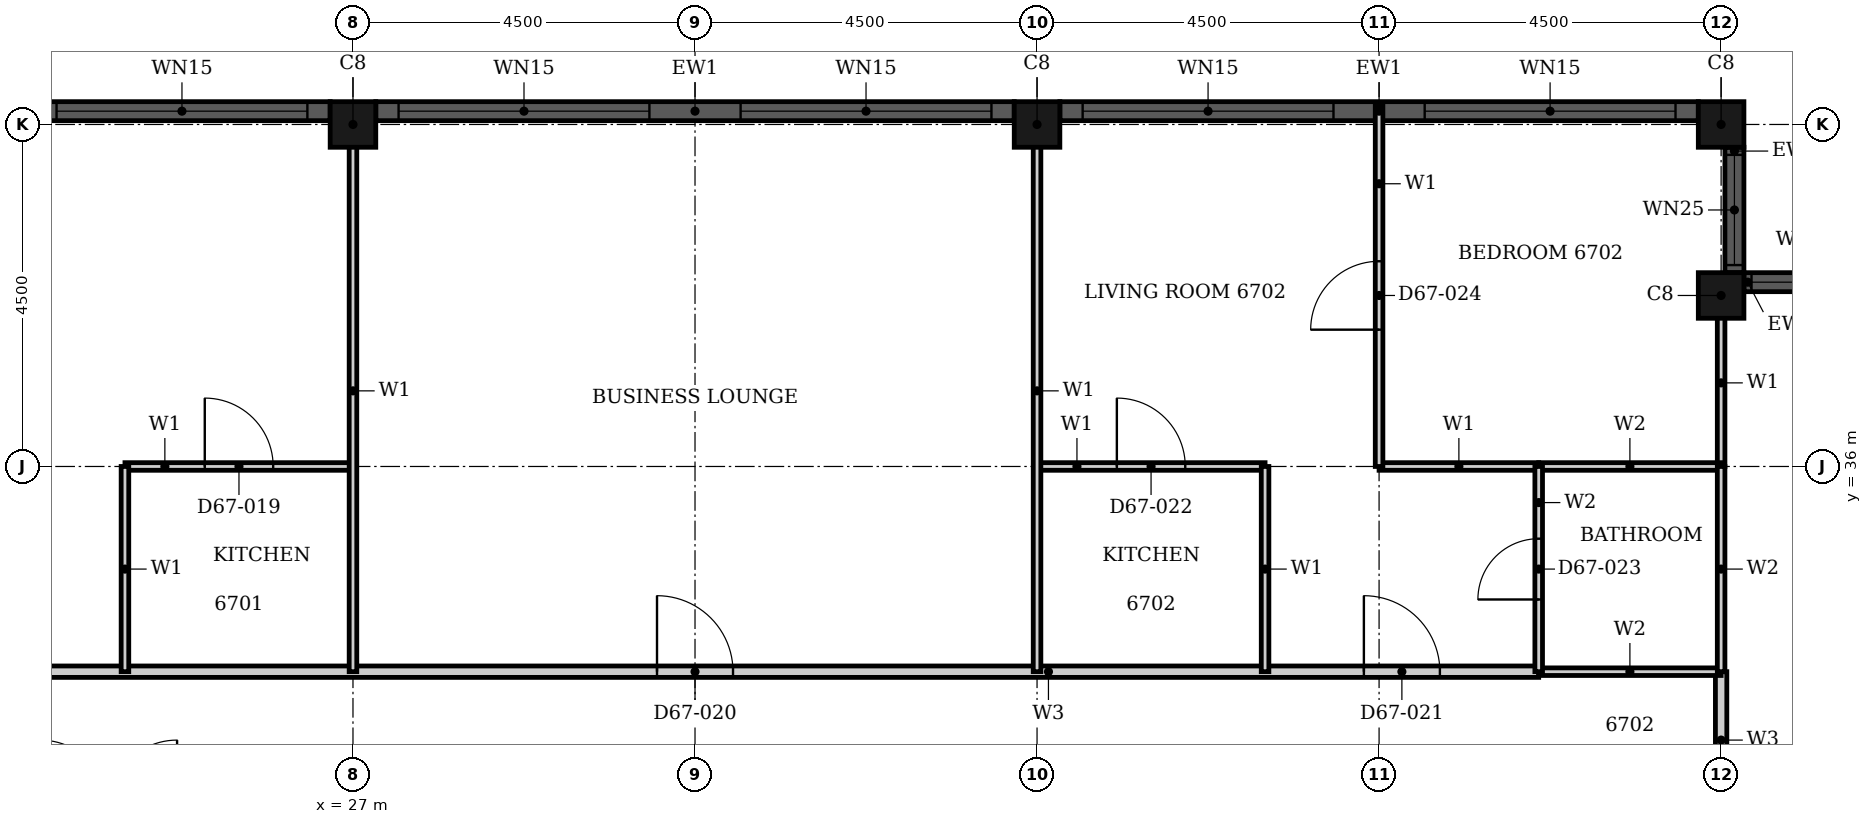
"""IFC4 building model, lengths in metres.
Left out: names, types, materials, properties, quantities, classifications, styles, units other than length and angle.
Written with IfcOpenShell. Run it as: python <this file> out.ifc"""

import sys

from ifc_helpers import new_model, si_unit, direction, frame, frame_2d, origin, origin_2d, place, context, subcontext, project, spatial, rectangle, hollow_rectangle, extrude, element, fill, save


model = new_model("IFC4")
c1 = context("Model", 3, precision=1e-05, world=origin(), true_north=direction((0.0, 1.0)))
c2 = subcontext(c1, "Body", "Model", "MODEL_VIEW")
j1 = project(units=[si_unit("LENGTHUNIT", "METRE"), si_unit("PLANEANGLEUNIT", "RADIAN")], contexts=[c1])
p1 = place(None, origin())
s1 = spatial("IfcSite", under=j1, at=p1, CompositionType="ELEMENT")
p2 = place(p1, origin())
s2 = spatial("IfcBuilding", under=s1, at=p2, CompositionType="ELEMENT")
p3 = place(p2, frame((0.0, 0.0, 263.8)))
s3 = spatial("IfcBuildingStorey", under=s2, at=p3, CompositionType="ELEMENT", Elevation=263.8)
for number, where, z_axis, x_axis in (
    (1, (45.0, 38.25, 0.0), (0.0, 0.0, 1.0), (1.0, 0.0, 0.0)),
    (2, (45.0, 40.5, 0.0), (0.0, 0.0, 1.0), (1.0, 0.0, 0.0)),
    (3, (36.0, 40.5, 0.0), (0.0, 0.0, 1.0), (1.0, 0.0, 0.0)),
    (4, (27.0, 40.5, 0.0), (0.0, 0.0, 1.0), (1.0, 0.0, 0.0)),
):
    element("IfcColumn", number, at=place(p3, frame(where, z_axis=z_axis, x_axis=x_axis)), inside=s3, PredefinedType="COLUMN", context=c2, shape_type="SweptSolid", body=[
        extrude(hollow_rectangle(XDim=0.6, YDim=0.6, WallThickness=0.02, at=origin_2d()), origin(), (0.0, 0.0, 1.0), 3.7),
    ])
p4 = place(p3, frame((46.95, 38.425, 0.0), z_axis=(0.0, 0.0, 1.0), x_axis=(-1.0, 0.0, 0.0)))
e5 = element("IfcWall", 5, at=p4, inside=s3, PredefinedType="SOLIDWALL", context=c2, shape_type="SweptSolid", body=[
    extrude(rectangle(XDim=1.65, YDim=0.25, at=frame_2d((0.825, 0.0))), origin(), (0.0, 0.0, 1.0), 3.7),
])
p5 = place(p4, frame((0.1, 0.0, 0.9)))
e6 = element("IfcOpeningElement", 6, at=p5, cuts=e5, PredefinedType="OPENING", context=c2, shape_type="SweptSolid", body=[
    extrude(rectangle(XDim=1.45, YDim=1.85, at=frame_2d((0.725, 0.925))), frame((0.0, 0.135, 0.0), z_axis=(0.0, -1.0, 0.0), x_axis=(1.0, 0.0, 0.0)), (0.0, 0.0, 1.0), 0.27),
])
p6 = place(p3, frame((45.175, 38.55, 0.0), z_axis=(0.0, 0.0, 1.0), x_axis=(0.0, 1.0, 0.0)))
e7 = element("IfcWall", 7, at=p6, inside=s3, PredefinedType="SOLIDWALL", context=c2, shape_type="SweptSolid", body=[
    extrude(rectangle(XDim=1.65, YDim=0.25, at=frame_2d((0.825, 0.0))), origin(), (0.0, 0.0, 1.0), 3.7),
])
p7 = place(p6, frame((0.1, 0.0, 0.9)))
e8 = element("IfcOpeningElement", 8, at=p7, cuts=e7, PredefinedType="OPENING", context=c2, shape_type="SweptSolid", body=[
    extrude(rectangle(XDim=1.45, YDim=1.85, at=frame_2d((0.725, 0.925))), frame((0.0, 0.135, 0.0), z_axis=(0.0, -1.0, 0.0), x_axis=(1.0, 0.0, 0.0)), (0.0, 0.0, 1.0), 0.27),
])
p8 = place(p3, frame((44.7, 40.675, 0.0), z_axis=(0.0, 0.0, 1.0), x_axis=(-1.0, 0.0, 0.0)))
e9 = element("IfcWall", 9, at=p8, inside=s3, PredefinedType="SOLIDWALL", context=c2, shape_type="SweptSolid", body=[
    extrude(rectangle(XDim=8.4, YDim=0.25, at=frame_2d((4.2, 0.0))), origin(), (0.0, 0.0, 1.0), 3.7),
])
p9 = place(p8, frame((0.3, 0.0, 0.45)))
e10 = element("IfcOpeningElement", 10, at=p9, cuts=e9, PredefinedType="OPENING", context=c2, shape_type="SweptSolid", body=[
    extrude(rectangle(XDim=3.3, YDim=2.3, at=frame_2d((1.65, 1.15))), frame((0.0, 0.135, 0.0), z_axis=(0.0, -1.0, 0.0), x_axis=(1.0, 0.0, 0.0)), (0.0, 0.0, 1.0), 0.27),
])
p10 = place(p8, frame((4.8, 0.0, 0.45)))
e11 = element("IfcOpeningElement", 11, at=p10, cuts=e9, PredefinedType="OPENING", context=c2, shape_type="SweptSolid", body=[
    extrude(rectangle(XDim=3.3, YDim=2.3, at=frame_2d((1.65, 1.15))), frame((0.0, 0.135, 0.0), z_axis=(0.0, -1.0, 0.0), x_axis=(1.0, 0.0, 0.0)), (0.0, 0.0, 1.0), 0.27),
])
p11 = place(p3, frame((35.7, 40.675, 0.0), z_axis=(0.0, 0.0, 1.0), x_axis=(-1.0, 0.0, 0.0)))
e12 = element("IfcWall", 12, at=p11, inside=s3, PredefinedType="SOLIDWALL", context=c2, shape_type="SweptSolid", body=[
    extrude(rectangle(XDim=8.4, YDim=0.25, at=frame_2d((4.2, 0.0))), origin(), (0.0, 0.0, 1.0), 3.7),
])
p12 = place(p11, frame((0.3, 0.0, 0.45)))
e13 = element("IfcOpeningElement", 13, at=p12, cuts=e12, PredefinedType="OPENING", context=c2, shape_type="SweptSolid", body=[
    extrude(rectangle(XDim=3.3, YDim=2.3, at=frame_2d((1.65, 1.15))), frame((0.0, 0.135, 0.0), z_axis=(0.0, -1.0, 0.0), x_axis=(1.0, 0.0, 0.0)), (0.0, 0.0, 1.0), 0.27),
])
p13 = place(p11, frame((4.8, 0.0, 0.45)))
e14 = element("IfcOpeningElement", 14, at=p13, cuts=e12, PredefinedType="OPENING", context=c2, shape_type="SweptSolid", body=[
    extrude(rectangle(XDim=3.3, YDim=2.3, at=frame_2d((1.65, 1.15))), frame((0.0, 0.135, 0.0), z_axis=(0.0, -1.0, 0.0), x_axis=(1.0, 0.0, 0.0)), (0.0, 0.0, 1.0), 0.27),
])
p14 = place(p3, frame((26.7, 40.675, 0.0), z_axis=(0.0, 0.0, 1.0), x_axis=(-1.0, 0.0, 0.0)))
e15 = element("IfcWall", 15, at=p14, inside=s3, PredefinedType="SOLIDWALL", context=c2, shape_type="SweptSolid", body=[
    extrude(rectangle(XDim=8.4, YDim=0.25, at=frame_2d((4.2, 0.0))), origin(), (0.0, 0.0, 1.0), 3.7),
])
p15 = place(p14, frame((0.3, 0.0, 0.45)))
e16 = element("IfcOpeningElement", 16, at=p15, cuts=e15, PredefinedType="OPENING", context=c2, shape_type="SweptSolid", body=[
    extrude(rectangle(XDim=3.3, YDim=2.3, at=frame_2d((1.65, 1.15))), frame((0.0, 0.135, 0.0), z_axis=(0.0, -1.0, 0.0), x_axis=(1.0, 0.0, 0.0)), (0.0, 0.0, 1.0), 0.27),
])
p16 = place(p14, frame((4.8, 0.0, 0.45)))
e17 = element("IfcOpeningElement", 17, at=p16, cuts=e15, PredefinedType="OPENING", context=c2, shape_type="SweptSolid", body=[
    extrude(rectangle(XDim=3.3, YDim=2.3, at=frame_2d((1.65, 1.15))), frame((0.0, 0.135, 0.0), z_axis=(0.0, -1.0, 0.0), x_axis=(1.0, 0.0, 0.0)), (0.0, 0.0, 1.0), 0.27),
])
p17 = place(p3, frame((20.4, 33.3, 0.0), z_axis=(0.0, 0.0, 1.0), x_axis=(1.0, 0.0, 0.0)))
e18 = element("IfcWall", 18, at=p17, inside=s3, PredefinedType="PARTITIONING", context=c2, shape_type="SweptSolid", body=[
    extrude(rectangle(XDim=22.2, YDim=0.15, at=frame_2d((11.1, 0.0))), origin(), (0.0, 0.0, 1.0), 3.4),
])
p18 = place(p17, frame((1.3, 0.0, 0.0)))
e19 = element("IfcOpeningElement", 19, at=p18, cuts=e18, PredefinedType="OPENING", context=c2, shape_type="SweptSolid", body=[
    extrude(rectangle(XDim=1.0, YDim=2.2, at=frame_2d((0.5, 1.1))), frame((0.0, 0.085, 0.0), z_axis=(0.0, -1.0, 0.0), x_axis=(1.0, 0.0, 0.0)), (0.0, 0.0, 1.0), 0.17),
])
p19 = place(p17, frame((10.6, 0.0, 0.0)))
e20 = element("IfcOpeningElement", 20, at=p19, cuts=e18, PredefinedType="OPENING", context=c2, shape_type="SweptSolid", body=[
    extrude(rectangle(XDim=1.0, YDim=2.1, at=frame_2d((0.5, 1.05))), frame((0.0, 0.085, 0.0), z_axis=(0.0, -1.0, 0.0), x_axis=(1.0, 0.0, 0.0)), (0.0, 0.0, 1.0), 0.17),
])
p20 = place(p17, frame((19.9, 0.0, 0.0)))
e21 = element("IfcOpeningElement", 21, at=p20, cuts=e18, PredefinedType="OPENING", context=c2, shape_type="SweptSolid", body=[
    extrude(rectangle(XDim=1.0, YDim=2.2, at=frame_2d((0.5, 1.1))), frame((0.0, 0.085, 0.0), z_axis=(0.0, -1.0, 0.0), x_axis=(1.0, 0.0, 0.0)), (0.0, 0.0, 1.0), 0.17),
])
p21 = place(p3, frame((45.0, 31.5, 0.0), z_axis=(0.0, 0.0, 1.0), x_axis=(0.0, 1.0, 0.0)))
e22 = element("IfcWall", 22, at=p21, inside=s3, PredefinedType="PARTITIONING", context=c2, shape_type="SweptSolid", body=[
    extrude(rectangle(XDim=1.8, YDim=0.15, at=frame_2d((0.9, 0.0))), origin(), (0.0, 0.0, 1.0), 3.4),
])
p22 = place(p3, frame((24.0, 36.0, 0.0), z_axis=(0.0, 0.0, 1.0), x_axis=(1.0, 0.0, 0.0)))
e23 = element("IfcWall", 23, at=p22, inside=s3, PredefinedType="PARTITIONING", context=c2, shape_type="SweptSolid", body=[
    extrude(rectangle(XDim=3.0, YDim=0.1, at=frame_2d((1.5, 0.0))), origin(), (0.0, 0.0, 1.0), 3.4),
])
p23 = place(p22, frame((1.05, 0.0, 0.0)))
e24 = element("IfcOpeningElement", 24, at=p23, cuts=e23, PredefinedType="OPENING", context=c2, shape_type="SweptSolid", body=[
    extrude(rectangle(XDim=0.9, YDim=2.1, at=frame_2d((0.45, 1.05))), frame((0.0, 0.06, 0.0), z_axis=(0.0, -1.0, 0.0), x_axis=(1.0, 0.0, 0.0)), (0.0, 0.0, 1.0), 0.12),
])
p24 = place(p3, frame((40.5, 36.0, 0.0), z_axis=(0.0, 0.0, 1.0), x_axis=(1.0, 0.0, 0.0)))
e25 = element("IfcWall", 25, at=p24, inside=s3, PredefinedType="PARTITIONING", context=c2, shape_type="SweptSolid", body=[
    extrude(rectangle(XDim=2.1, YDim=0.1, at=frame_2d((1.05, 0.0))), origin(), (0.0, 0.0, 1.0), 3.4),
])
p25 = place(p3, frame((36.0, 36.0, 0.0), z_axis=(0.0, 0.0, 1.0), x_axis=(1.0, 0.0, 0.0)))
e26 = element("IfcWall", 26, at=p25, inside=s3, PredefinedType="PARTITIONING", context=c2, shape_type="SweptSolid", body=[
    extrude(rectangle(XDim=3.0, YDim=0.1, at=frame_2d((1.5, 0.0))), origin(), (0.0, 0.0, 1.0), 3.4),
])
p26 = place(p25, frame((1.05, 0.0, 0.0)))
e27 = element("IfcOpeningElement", 27, at=p26, cuts=e26, PredefinedType="OPENING", context=c2, shape_type="SweptSolid", body=[
    extrude(rectangle(XDim=0.9, YDim=2.1, at=frame_2d((0.45, 1.05))), frame((0.0, 0.06, 0.0), z_axis=(0.0, -1.0, 0.0), x_axis=(1.0, 0.0, 0.0)), (0.0, 0.0, 1.0), 0.12),
])
p27 = place(p3, frame((24.0, 33.3, 0.0), z_axis=(0.0, 0.0, 1.0), x_axis=(0.0, 1.0, 0.0)))
e28 = element("IfcWall", 28, at=p27, inside=s3, PredefinedType="PARTITIONING", context=c2, shape_type="SweptSolid", body=[
    extrude(rectangle(XDim=2.7, YDim=0.1, at=frame_2d((1.35, 0.0))), origin(), (0.0, 0.0, 1.0), 3.4),
])
for number, where, z_axis, x_axis in (
    (29, (27.0, 33.3, 0.0), (0.0, 0.0, 1.0), (0.0, 1.0, 0.0)),
    (30, (36.0, 33.3, 0.0), (0.0, 0.0, 1.0), (0.0, 1.0, 0.0)),
):
    element("IfcWall", number, at=place(p3, frame(where, z_axis=z_axis, x_axis=x_axis)), inside=s3, PredefinedType="PARTITIONING", context=c2, shape_type="SweptSolid", body=[
        extrude(rectangle(XDim=7.39, YDim=0.1, at=frame_2d((3.695, 0.0))), origin(), (0.0, 0.0, 1.0), 3.4),
    ])
p28 = place(p3, frame((39.0, 33.3, 0.0), z_axis=(0.0, 0.0, 1.0), x_axis=(0.0, 1.0, 0.0)))
e31 = element("IfcWall", 31, at=p28, inside=s3, PredefinedType="PARTITIONING", context=c2, shape_type="SweptSolid", body=[
    extrude(rectangle(XDim=2.7, YDim=0.1, at=frame_2d((1.35, 0.0))), origin(), (0.0, 0.0, 1.0), 3.4),
])
p29 = place(p3, frame((40.5, 36.0, 0.0), z_axis=(0.0, 0.0, 1.0), x_axis=(0.0, 1.0, 0.0)))
e32 = element("IfcWall", 32, at=p29, inside=s3, PredefinedType="PARTITIONING", context=c2, shape_type="SweptSolid", body=[
    extrude(rectangle(XDim=4.74, YDim=0.1, at=frame_2d((2.37, 0.0))), origin(), (0.0, 0.0, 1.0), 3.4),
])
p30 = place(p29, frame((1.8, 0.0, 0.0)))
e33 = element("IfcOpeningElement", 33, at=p30, cuts=e32, PredefinedType="OPENING", context=c2, shape_type="SweptSolid", body=[
    extrude(rectangle(XDim=0.9, YDim=2.1, at=frame_2d((0.45, 1.05))), frame((0.0, 0.06, 0.0), z_axis=(0.0, -1.0, 0.0), x_axis=(1.0, 0.0, 0.0)), (0.0, 0.0, 1.0), 0.12),
])
p31 = place(p3, frame((45.0, 36.0, 0.0), z_axis=(0.0, 0.0, 1.0), x_axis=(0.0, 1.0, 0.0)))
e34 = element("IfcWall", 34, at=p31, inside=s3, PredefinedType="PARTITIONING", context=c2, shape_type="SweptSolid", body=[
    extrude(rectangle(XDim=2.2, YDim=0.1, at=frame_2d((1.1, 0.0))), origin(), (0.0, 0.0, 1.0), 3.4),
])
for number, where, z_axis, x_axis in (
    (35, (42.6, 33.3, 0.0), (0.0, 0.0, 1.0), (1.0, 0.0, 0.0)),
    (36, (42.6, 36.0, 0.0), (0.0, 0.0, 1.0), (1.0, 0.0, 0.0)),
):
    element("IfcWall", number, at=place(p3, frame(where, z_axis=z_axis, x_axis=x_axis)), inside=s3, PredefinedType="PARTITIONING", context=c2, shape_type="SweptSolid", body=[
        extrude(rectangle(XDim=2.4, YDim=0.1, at=frame_2d((1.2, 0.0))), origin(), (0.0, 0.0, 1.0), 3.4),
    ])
p32 = place(p3, frame((42.6, 33.3, 0.0), z_axis=(0.0, 0.0, 1.0), x_axis=(0.0, 1.0, 0.0)))
e37 = element("IfcWall", 37, at=p32, inside=s3, PredefinedType="PARTITIONING", context=c2, shape_type="SweptSolid", body=[
    extrude(rectangle(XDim=2.7, YDim=0.1, at=frame_2d((1.35, 0.0))), origin(), (0.0, 0.0, 1.0), 3.4),
])
p33 = place(p32, frame((0.95, 0.0, 0.0)))
e38 = element("IfcOpeningElement", 38, at=p33, cuts=e37, PredefinedType="OPENING", context=c2, shape_type="SweptSolid", body=[
    extrude(rectangle(XDim=0.8, YDim=2.1, at=frame_2d((0.4, 1.05))), frame((0.0, 0.06, 0.0), z_axis=(0.0, -1.0, 0.0), x_axis=(1.0, 0.0, 0.0)), (0.0, 0.0, 1.0), 0.12),
])
p34 = place(p3, frame((45.0, 33.3, 0.0), z_axis=(0.0, 0.0, 1.0), x_axis=(0.0, 1.0, 0.0)))
e39 = element("IfcWall", 39, at=p34, inside=s3, PredefinedType="PARTITIONING", context=c2, shape_type="SweptSolid", body=[
    extrude(rectangle(XDim=2.7, YDim=0.1, at=frame_2d((1.35, 0.0))), origin(), (0.0, 0.0, 1.0), 3.4),
])
p35 = place(p5, origin())
e40 = element("IfcWindow", 40, at=p35, inside=s3, PartitioningType="SINGLE_PANEL", PredefinedType="WINDOW", context=c2, shape_type="SweptSolid", body=[
    extrude(rectangle(XDim=1.45, YDim=1.85, at=frame_2d((0.725, 0.925))), frame((0.0, 0.03, 0.0), z_axis=(0.0, -1.0, 0.0), x_axis=(1.0, 0.0, 0.0)), (0.0, 0.0, 1.0), 0.06),
])
fill(e6, e40)
p36 = place(p7, origin())
e41 = element("IfcWindow", 41, at=p36, inside=s3, PartitioningType="SINGLE_PANEL", PredefinedType="WINDOW", context=c2, shape_type="SweptSolid", body=[
    extrude(rectangle(XDim=1.45, YDim=1.85, at=frame_2d((0.725, 0.925))), frame((0.0, 0.03, 0.0), z_axis=(0.0, -1.0, 0.0), x_axis=(1.0, 0.0, 0.0)), (0.0, 0.0, 1.0), 0.06),
])
fill(e8, e41)
p37 = place(p9, origin())
e42 = element("IfcWindow", 42, at=p37, inside=s3, PartitioningType="SINGLE_PANEL", PredefinedType="WINDOW", context=c2, shape_type="SweptSolid", body=[
    extrude(rectangle(XDim=3.3, YDim=2.3, at=frame_2d((1.65, 1.15))), frame((0.0, 0.03, 0.0), z_axis=(0.0, -1.0, 0.0), x_axis=(1.0, 0.0, 0.0)), (0.0, 0.0, 1.0), 0.06),
])
fill(e10, e42)
p38 = place(p10, origin())
e43 = element("IfcWindow", 43, at=p38, inside=s3, PartitioningType="SINGLE_PANEL", PredefinedType="WINDOW", context=c2, shape_type="SweptSolid", body=[
    extrude(rectangle(XDim=3.3, YDim=2.3, at=frame_2d((1.65, 1.15))), frame((0.0, 0.03, 0.0), z_axis=(0.0, -1.0, 0.0), x_axis=(1.0, 0.0, 0.0)), (0.0, 0.0, 1.0), 0.06),
])
fill(e11, e43)
p39 = place(p12, origin())
e44 = element("IfcWindow", 44, at=p39, inside=s3, PartitioningType="SINGLE_PANEL", PredefinedType="WINDOW", context=c2, shape_type="SweptSolid", body=[
    extrude(rectangle(XDim=3.3, YDim=2.3, at=frame_2d((1.65, 1.15))), frame((0.0, 0.03, 0.0), z_axis=(0.0, -1.0, 0.0), x_axis=(1.0, 0.0, 0.0)), (0.0, 0.0, 1.0), 0.06),
])
fill(e13, e44)
p40 = place(p13, origin())
e45 = element("IfcWindow", 45, at=p40, inside=s3, PartitioningType="SINGLE_PANEL", PredefinedType="WINDOW", context=c2, shape_type="SweptSolid", body=[
    extrude(rectangle(XDim=3.3, YDim=2.3, at=frame_2d((1.65, 1.15))), frame((0.0, 0.03, 0.0), z_axis=(0.0, -1.0, 0.0), x_axis=(1.0, 0.0, 0.0)), (0.0, 0.0, 1.0), 0.06),
])
fill(e14, e45)
p41 = place(p15, origin())
e46 = element("IfcWindow", 46, at=p41, inside=s3, PartitioningType="SINGLE_PANEL", PredefinedType="WINDOW", context=c2, shape_type="SweptSolid", body=[
    extrude(rectangle(XDim=3.3, YDim=2.3, at=frame_2d((1.65, 1.15))), frame((0.0, 0.03, 0.0), z_axis=(0.0, -1.0, 0.0), x_axis=(1.0, 0.0, 0.0)), (0.0, 0.0, 1.0), 0.06),
])
fill(e16, e46)
p42 = place(p23, origin())
e47 = element("IfcDoor", 47, at=p42, inside=s3, OperationType="SINGLE_SWING_RIGHT", PredefinedType="DOOR", context=c2, shape_type="SweptSolid", body=[
    extrude(rectangle(XDim=0.9, YDim=2.1, at=frame_2d((0.45, 1.05))), frame((0.0, 0.025, 0.0), z_axis=(0.0, -1.0, 0.0), x_axis=(1.0, 0.0, 0.0)), (0.0, 0.0, 1.0), 0.05),
])
fill(e24, e47)
p43 = place(p19, origin())
e48 = element("IfcDoor", 48, at=p43, inside=s3, OperationType="SINGLE_SWING_LEFT", PredefinedType="DOOR", context=c2, shape_type="SweptSolid", body=[
    extrude(rectangle(XDim=1.0, YDim=2.1, at=frame_2d((0.5, 1.05))), frame((0.0, 0.025, 0.0), z_axis=(0.0, -1.0, 0.0), x_axis=(1.0, 0.0, 0.0)), (0.0, 0.0, 1.0), 0.05),
])
fill(e20, e48)
p44 = place(p20, origin())
e49 = element("IfcDoor", 49, at=p44, inside=s3, OperationType="SINGLE_SWING_RIGHT", PredefinedType="DOOR", context=c2, shape_type="SweptSolid", body=[
    extrude(rectangle(XDim=1.0, YDim=2.2, at=frame_2d((0.5, 1.1))), frame((0.0, 0.025, 0.0), z_axis=(0.0, -1.0, 0.0), x_axis=(1.0, 0.0, 0.0)), (0.0, 0.0, 1.0), 0.05),
])
fill(e21, e49)
p45 = place(p26, origin())
e50 = element("IfcDoor", 50, at=p45, inside=s3, OperationType="SINGLE_SWING_LEFT", PredefinedType="DOOR", context=c2, shape_type="SweptSolid", body=[
    extrude(rectangle(XDim=0.9, YDim=2.1, at=frame_2d((0.45, 1.05))), frame((0.0, 0.025, 0.0), z_axis=(0.0, -1.0, 0.0), x_axis=(1.0, 0.0, 0.0)), (0.0, 0.0, 1.0), 0.05),
])
fill(e27, e50)
p46 = place(p33, origin())
e51 = element("IfcDoor", 51, at=p46, inside=s3, OperationType="SINGLE_SWING_LEFT", PredefinedType="DOOR", context=c2, shape_type="SweptSolid", body=[
    extrude(rectangle(XDim=0.8, YDim=2.1, at=frame_2d((0.4, 1.05))), frame((0.0, 0.025, 0.0), z_axis=(0.0, -1.0, 0.0), x_axis=(1.0, 0.0, 0.0)), (0.0, 0.0, 1.0), 0.05),
])
fill(e38, e51)
p47 = place(p30, origin())
e52 = element("IfcDoor", 52, at=p47, inside=s3, OperationType="SINGLE_SWING_LEFT", PredefinedType="DOOR", context=c2, shape_type="SweptSolid", body=[
    extrude(rectangle(XDim=0.9, YDim=2.1, at=frame_2d((0.45, 1.05))), frame((0.0, 0.025, 0.0), z_axis=(0.0, -1.0, 0.0), x_axis=(1.0, 0.0, 0.0)), (0.0, 0.0, 1.0), 0.05),
])
fill(e33, e52)
save(model, sys.argv[1])
